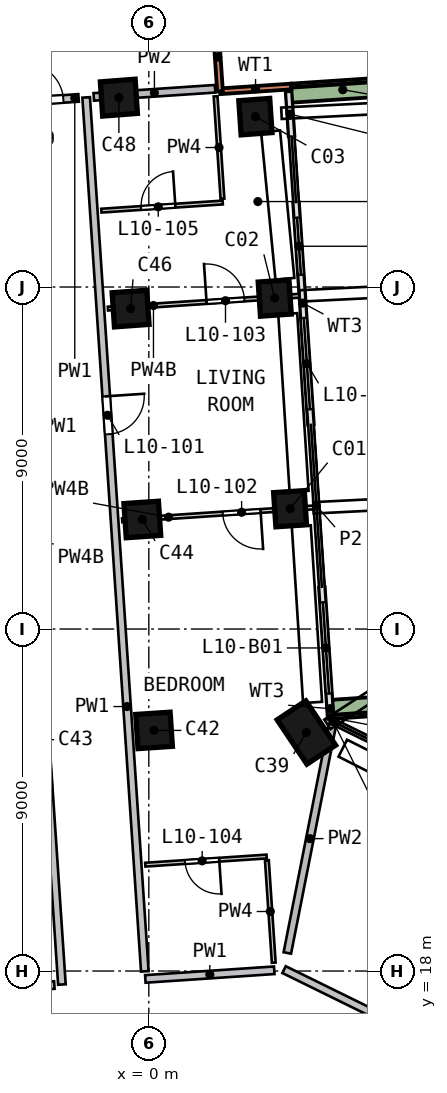
"""IFC4 building model, lengths in metres.
Left out: names, types, materials, properties, quantities, classifications, styles, units other than length and angle.
Written with IfcOpenShell. Run it as: python <this file> out.ifc"""

import sys

from ifc_helpers import new_model, si_unit, direction, frame, frame_2d, origin, origin_2d, place, context, subcontext, project, spatial, rectangle, extrude, element, fill, save


model = new_model("IFC4")
c1 = context("Model", 3, precision=1e-05, world=origin(), true_north=direction((0.0, 1.0)))
c2 = subcontext(c1, "Body", "Model", "MODEL_VIEW")
j1 = project(units=[si_unit("LENGTHUNIT", "METRE"), si_unit("PLANEANGLEUNIT", "RADIAN")], contexts=[c1])
p1 = place(None, origin())
s1 = spatial("IfcSite", under=j1, at=p1, CompositionType="ELEMENT")
p2 = place(p1, origin())
s2 = spatial("IfcBuilding", under=s1, at=p2, CompositionType="ELEMENT")
p3 = place(p2, frame((0.0, 0.0, 49.5)))
s3 = spatial("IfcBuildingStorey", under=s2, at=p3, CompositionType="ELEMENT", Elevation=49.5)
p4 = place(p3, frame((3.888, 30.17, 0.0), z_axis=(-0.141378211, -0.003182146, 0.989950542), x_axis=(-0.066245791, 0.997783739, -0.006253462)))
e1 = element("IfcColumn", 1, at=p4, inside=s3, PredefinedType="COLUMN", context=c2, shape_type="SweptSolid", body=[
    extrude(rectangle(XDim=0.9, YDim=0.8, at=origin_2d()), origin(), (0.0, 0.0, 1.0), 3.222),
])
p5 = place(p3, frame((3.514, 35.74, 0.0), z_axis=(-0.16539803, -0.025428438, 0.985899024), x_axis=(-0.069309244, 0.997495574, 0.014099965)))
e2 = element("IfcColumn", 2, at=p5, inside=s3, PredefinedType="COLUMN", context=c2, shape_type="SweptSolid", body=[
    extrude(rectangle(XDim=0.9, YDim=0.8, at=origin_2d()), origin(), (0.0, 0.0, 1.0), 3.236),
])
p6 = place(p3, frame((3.032, 40.542, 0.0), z_axis=(-0.185536283, -0.047999063, 0.981464405), x_axis=(-0.073598719, 0.996679535, 0.034830047)))
e3 = element("IfcColumn", 3, at=p6, inside=s3, PredefinedType="COLUMN", context=c2, shape_type="SweptSolid", body=[
    extrude(rectangle(XDim=0.9, YDim=0.8, at=origin_2d()), origin(), (0.0, 0.0, 1.0), 3.25),
])
p7 = place(p3, frame((4.285, 24.253, 0.0), z_axis=(-0.115456489, 0.019382097, 0.993123423), x_axis=(0.549525351, -0.831626922, 0.080115864)))
e4 = element("IfcColumn", 4, at=p7, inside=s3, PredefinedType="COLUMN", context=c2, shape_type="SweptSolid", body=[
    extrude(rectangle(XDim=1.4, YDim=0.9, at=origin_2d()), origin(), (0.0, 0.0, 1.0), 3.212),
])
p8 = place(p3, frame((0.278, 24.332, 0.0), z_axis=(-0.11570319, 0.000380102, 0.99328376), x_axis=(-0.065780406, 0.997801697, -0.008044297)))
e5 = element("IfcColumn", 5, at=p8, inside=s3, PredefinedType="COLUMN", context=c2, shape_type="SweptSolid", body=[
    extrude(rectangle(XDim=0.9, YDim=0.9, at=origin_2d()), origin(), (0.0, 0.0, 1.0), 3.211),
])
p9 = place(p3, frame((-0.001, 29.909, 0.0), z_axis=(-0.140009368, -0.021592354, 0.989914717), x_axis=(-0.06878046, 0.997559272, 0.012031081)))
e6 = element("IfcColumn", 6, at=p9, inside=s3, PredefinedType="COLUMN", context=c2, shape_type="SweptSolid", body=[
    extrude(rectangle(XDim=0.9, YDim=0.9, at=origin_2d()), origin(), (0.0, 0.0, 1.0), 3.222),
])
p10 = place(p3, frame((-0.28, 35.486, 0.0), z_axis=(-0.163975747, -0.043294424, 0.985513849), x_axis=(-0.07220614, 0.996883302, 0.0317798)))
e7 = element("IfcColumn", 7, at=p10, inside=s3, PredefinedType="COLUMN", context=c2, shape_type="SweptSolid", body=[
    extrude(rectangle(XDim=0.9, YDim=0.9, at=origin_2d()), origin(), (0.0, 0.0, 1.0), 3.237),
])
p11 = place(p3, frame((-0.558, 41.063, 0.0), z_axis=(-0.187533048, -0.064736408, 0.980122724), x_axis=(-0.076631345, 0.995748863, 0.051106146)))
e8 = element("IfcColumn", 8, at=p11, inside=s3, PredefinedType="COLUMN", context=c2, shape_type="SweptSolid", body=[
    extrude(rectangle(XDim=0.9, YDim=0.9, at=origin_2d()), origin(), (0.0, 0.0, 1.0), 3.255),
])
p12 = place(p3, frame((3.744, 41.276, 0.0), z_axis=(0.0, 0.0, 1.0), x_axis=(-0.997757997, -0.066925174, 0.0)))
e9 = element("IfcWall", 9, at=p12, inside=s3, PredefinedType="SOLIDWALL", context=c2, shape_type="SweptSolid", body=[
    extrude(rectangle(XDim=1.875, YDim=0.15, at=frame_2d((0.938, 0.0))), origin(), (0.0, 0.0, 1.0), 3.19),
])
p13 = place(p3, frame((1.873, 41.151, 0.0), z_axis=(0.0, 0.0, 1.0), x_axis=(-0.067005139, 0.99775263, 0.0)))
e10 = element("IfcWall", 10, at=p13, inside=s3, PredefinedType="SOLIDWALL", context=c2, shape_type="SweptSolid", body=[
    extrude(rectangle(XDim=1.8, YDim=0.15, at=frame_2d((0.9, 0.0))), origin(), (0.0, 0.0, 1.0), 3.19),
])
p14 = place(p3, frame((4.781, 24.704, 0.0), z_axis=(0.0, 0.0, 1.0), x_axis=(-0.066962013, 0.997755526, 0.0)))
e11 = element("IfcWall", 11, at=p14, inside=s3, PredefinedType="SOLIDWALL", context=c2, shape_type="SweptSolid", body=[
    extrude(rectangle(XDim=3.402, YDim=0.15, at=frame_2d((1.701, 0.0))), origin(), (0.0, 0.0, 1.0), 2.425),
])
p15 = place(p14, frame((0.602, 0.0, 0.0)))
e12 = element("IfcOpeningElement", 12, at=p15, cuts=e11, PredefinedType="OPENING", context=c2, shape_type="SweptSolid", body=[
    extrude(rectangle(XDim=2.4, YDim=2.4, at=frame_2d((1.2, 1.2))), frame((0.0, 0.085, 0.0), z_axis=(0.0, -1.0, 0.0), x_axis=(1.0, 0.0, 0.0)), (0.0, 0.0, 1.0), 0.17),
])
p16 = place(p3, frame((4.266, 32.387, 0.0), z_axis=(0.0, 0.0, 1.0), x_axis=(-0.066996111, 0.997753237, 0.0)))
e13 = element("IfcWall", 13, at=p16, inside=s3, PredefinedType="SOLIDWALL", context=c2, shape_type="SweptSolid", body=[
    extrude(rectangle(XDim=3.396, YDim=0.15, at=frame_2d((1.698, 0.0))), origin(), (0.0, 0.0, 1.0), 2.425),
])
p17 = place(p16, frame((0.4, 0.0, 0.0)))
e14 = element("IfcOpeningElement", 14, at=p17, cuts=e13, PredefinedType="OPENING", context=c2, shape_type="SweptSolid", body=[
    extrude(rectangle(XDim=2.4, YDim=2.4, at=frame_2d((1.2, 1.2))), frame((0.0, 0.085, 0.0), z_axis=(0.0, -1.0, 0.0), x_axis=(1.0, 0.0, 0.0)), (0.0, 0.0, 1.0), 0.17),
])
p18 = place(p3, frame((4.038, 35.776, 0.0), z_axis=(0.0, 0.0, 1.0), x_axis=(-0.066968778, 0.997755072, 0.0)))
e15 = element("IfcWall", 15, at=p18, inside=s3, PredefinedType="SOLIDWALL", context=c2, shape_type="SweptSolid", body=[
    extrude(rectangle(XDim=2.45, YDim=0.15, at=frame_2d((1.225, 0.0))), origin(), (0.0, 0.0, 1.0), 2.425),
])
p19 = place(p18, frame((0.55, 0.0, 0.0)))
e16 = element("IfcOpeningElement", 16, at=p19, cuts=e15, PredefinedType="OPENING", context=c2, shape_type="SweptSolid", body=[
    extrude(rectangle(XDim=1.5, YDim=2.4, at=frame_2d((0.75, 1.2))), frame((0.0, 0.085, 0.0), z_axis=(0.0, -1.0, 0.0), x_axis=(1.0, 0.0, 0.0)), (0.0, 0.0, 1.0), 0.17),
])
p20 = place(p3, frame((3.756, 39.974, 0.0), z_axis=(0.0, 0.0, 1.0), x_axis=(-0.066995929, 0.997753249, 0.0)))
e17 = element("IfcWall", 17, at=p20, inside=s3, PredefinedType="SOLIDWALL", context=c2, shape_type="SweptSolid", body=[
    extrude(rectangle(XDim=1.155, YDim=0.15, at=frame_2d((0.578, 0.0))), origin(), (0.0, 0.0, 1.0), 2.425),
])
p21 = place(p3, frame((4.845, 24.889, 0.0), z_axis=(0.0, 0.0, 1.0), x_axis=(0.997752622, 0.067005263, 0.0)))
e18 = element("IfcWall", 18, at=p21, inside=s3, PredefinedType="SOLIDWALL", context=c2, shape_type="SweptSolid", body=[
    extrude(rectangle(XDim=3.199, YDim=0.5, at=frame_2d((1.6, 0.0))), origin(), (0.0, 0.0, 1.0), 0.7),
])
p22 = place(p3, frame((6.45, 41.283, 0.0), z_axis=(0.0, 0.0, 1.0), x_axis=(-0.997751006, -0.067029329, 0.0)))
e19 = element("IfcWall", 19, at=p22, inside=s3, PredefinedType="SOLIDWALL", context=c2, shape_type="SweptSolid", body=[
    extrude(rectangle(XDim=2.699, YDim=0.5, at=frame_2d((1.35, 0.0))), origin(), (0.0, 0.0, 1.0), 0.7),
])
p23 = place(p3, frame((-2.486, 17.631, 0.0), z_axis=(0.0, 0.0, 1.0), x_axis=(-0.997758214, -0.066921946, 0.0)))
e20 = element("IfcWall", 20, at=p23, inside=s3, PredefinedType="SOLIDWALL", context=c2, shape_type="SweptSolid", body=[
    extrude(rectangle(XDim=3.458, YDim=0.2, at=frame_2d((1.729, 0.0))), origin(), (0.0, 0.0, 1.0), 3.19),
])
p24 = place(p3, frame((-2.287, 17.645, 0.0), z_axis=(0.0, 0.0, 1.0), x_axis=(-0.066974116, 0.997754713, 0.0)))
e21 = element("IfcWall", 21, at=p24, inside=s3, PredefinedType="SOLIDWALL", context=c2, shape_type="SweptSolid", body=[
    extrude(rectangle(XDim=23.25, YDim=0.2, at=frame_2d((11.625, 0.0))), origin(), (0.0, 0.0, 1.0), 3.19),
])
p25 = place(p24, frame((4.95, 0.0, 0.0)))
e22 = element("IfcOpeningElement", 22, at=p25, cuts=e21, PredefinedType="OPENING", context=c2, shape_type="SweptSolid", body=[
    extrude(rectangle(XDim=1.0, YDim=2.1, at=frame_2d((0.5, 1.05))), frame((0.0, 0.11, 0.0), z_axis=(0.0, -1.0, 0.0), x_axis=(1.0, 0.0, 0.0)), (0.0, 0.0, 1.0), 0.22),
])
p26 = place(p3, frame((-3.646, 40.855, 0.0), z_axis=(0.0, 0.0, 1.0), x_axis=(0.997748437, 0.067067555, 0.0)))
e23 = element("IfcWall", 23, at=p26, inside=s3, PredefinedType="SOLIDWALL", context=c2, shape_type="SweptSolid", body=[
    extrude(rectangle(XDim=1.802, YDim=0.2, at=frame_2d((0.901, 0.0))), origin(), (0.0, 0.0, 1.0), 3.19),
])
p27 = place(p26, frame((0.4, 0.0, 0.0)))
e24 = element("IfcOpeningElement", 24, at=p27, cuts=e23, PredefinedType="OPENING", context=c2, shape_type="SweptSolid", body=[
    extrude(rectangle(XDim=1.0, YDim=2.1, at=frame_2d((0.5, 1.05))), frame((0.0, 0.11, 0.0), z_axis=(0.0, -1.0, 0.0), x_axis=(1.0, 0.0, 0.0)), (0.0, 0.0, 1.0), 0.22),
])
p28 = place(p3, frame((-1.649, 40.99, 0.0), z_axis=(0.0, 0.0, 1.0), x_axis=(0.066973147, -0.997754778, 0.0)))
e25 = element("IfcWall", 25, at=p28, inside=s3, PredefinedType="SOLIDWALL", context=c2, shape_type="SweptSolid", body=[
    extrude(rectangle(XDim=23.05, YDim=0.2, at=frame_2d((11.525, 0.0))), origin(), (0.0, 0.0, 1.0), 3.19),
])
p29 = place(p28, frame((7.883, 0.0, 0.0)))
e26 = element("IfcOpeningElement", 26, at=p29, cuts=e25, PredefinedType="OPENING", context=c2, shape_type="SweptSolid", body=[
    extrude(rectangle(XDim=1.0, YDim=2.1, at=frame_2d((0.5, 1.05))), frame((0.0, 0.11, 0.0), z_axis=(0.0, -1.0, 0.0), x_axis=(1.0, 0.0, 0.0)), (0.0, 0.0, 1.0), 0.22),
])
p30 = place(p3, frame((3.301, 18.02, 0.0), z_axis=(0.0, 0.0, 1.0), x_axis=(-0.997753271, -0.066995596, 0.0)))
e27 = element("IfcWall", 27, at=p30, inside=s3, PredefinedType="SOLIDWALL", context=c2, shape_type="SweptSolid", body=[
    extrude(rectangle(XDim=3.4, YDim=0.2, at=frame_2d((1.7, 0.0))), origin(), (0.0, 0.0, 1.0), 3.19),
])
p31 = place(p3, frame((12.1, 13.842, 0.0), z_axis=(0.0, 0.0, 1.0), x_axis=(-0.897570713, 0.44087052, 0.0)))
e28 = element("IfcWall", 28, at=p31, inside=s3, PredefinedType="SOLIDWALL", context=c2, shape_type="SweptSolid", body=[
    extrude(rectangle(XDim=9.516, YDim=0.2, at=frame_2d((4.758, 0.0))), origin(), (0.0, 0.0, 1.0), 3.19),
])
p32 = place(p3, frame((-1.449, 41.003, 0.0), z_axis=(0.0, 0.0, 1.0), x_axis=(0.997753992, 0.06698486, 0.0)))
e29 = element("IfcWall", 29, at=p32, inside=s3, PredefinedType="SOLIDWALL", context=c2, shape_type="SweptSolid", body=[
    extrude(rectangle(XDim=3.2, YDim=0.2, at=frame_2d((1.6, 0.0))), origin(), (0.0, 0.0, 1.0), 3.19),
])
p33 = place(p3, frame((4.832, 24.492, 0.0), z_axis=(0.0, 0.0, 1.0), x_axis=(-0.193535211, -0.98109333, 0.0)))
e30 = element("IfcWall", 30, at=p33, inside=s3, PredefinedType="SOLIDWALL", context=c2, shape_type="SweptSolid", body=[
    extrude(rectangle(XDim=6.132, YDim=0.2, at=frame_2d((3.066, 0.0))), origin(), (0.0, 0.0, 1.0), 3.19),
])
p34 = place(p3, frame((-1.248, 38.01, 0.0), z_axis=(0.0, 0.0, 1.0), x_axis=(0.997753992, 0.06698486, 0.0)))
e31 = element("IfcWall", 31, at=p34, inside=s3, PredefinedType="PARTITIONING", context=c2, shape_type="SweptSolid", body=[
    extrude(rectangle(XDim=3.2, YDim=0.1, at=frame_2d((1.6, 0.0))), origin(), (0.0, 0.0, 1.0), 3.19),
])
p35 = place(p34, frame((1.05, 0.0, 0.0)))
e32 = element("IfcOpeningElement", 32, at=p35, cuts=e31, PredefinedType="OPENING", context=c2, shape_type="SweptSolid", body=[
    extrude(rectangle(XDim=0.9, YDim=2.1, at=frame_2d((0.45, 1.05))), frame((0.0, 0.06, 0.0), z_axis=(0.0, -1.0, 0.0), x_axis=(1.0, 0.0, 0.0)), (0.0, 0.0, 1.0), 0.12),
])
p36 = place(p3, frame((-1.075, 35.432, 0.0), z_axis=(0.0, 0.0, 1.0), x_axis=(0.997755754, 0.066958606, 0.0)))
e33 = element("IfcWall", 33, at=p36, inside=s3, PredefinedType="PARTITIONING", context=c2, shape_type="SweptSolid", body=[
    extrude(rectangle(XDim=5.05, YDim=0.1, at=frame_2d((2.525, 0.0))), origin(), (0.0, 0.0, 1.0), 2.69),
])
p37 = place(p36, frame((2.6, 0.0, 0.0)))
e34 = element("IfcOpeningElement", 34, at=p37, cuts=e33, PredefinedType="OPENING", context=c2, shape_type="SweptSolid", body=[
    extrude(rectangle(XDim=1.0, YDim=2.1, at=frame_2d((0.5, 1.05))), frame((0.0, 0.06, 0.0), z_axis=(0.0, -1.0, 0.0), x_axis=(1.0, 0.0, 0.0)), (0.0, 0.0, 1.0), 0.12),
])
p38 = place(p3, frame((3.1, 21.013, 0.0), z_axis=(0.0, 0.0, 1.0), x_axis=(-0.99775365, -0.06698996, 0.0)))
e35 = element("IfcWall", 35, at=p38, inside=s3, PredefinedType="PARTITIONING", context=c2, shape_type="SweptSolid", body=[
    extrude(rectangle(XDim=3.2, YDim=0.1, at=frame_2d((1.6, 0.0))), origin(), (0.0, 0.0, 1.0), 3.19),
])
p39 = place(p38, frame((1.25, 0.0, 0.0)))
e36 = element("IfcOpeningElement", 36, at=p39, cuts=e35, PredefinedType="OPENING", context=c2, shape_type="SweptSolid", body=[
    extrude(rectangle(XDim=0.9, YDim=2.1, at=frame_2d((0.45, 1.05))), frame((0.0, 0.06, 0.0), z_axis=(0.0, -1.0, 0.0), x_axis=(1.0, 0.0, 0.0)), (0.0, 0.0, 1.0), 0.12),
])
p40 = place(p3, frame((4.337, 30.2, 0.0), z_axis=(0.0, 0.0, 1.0), x_axis=(-0.997755754, -0.066958606, 0.0)))
e37 = element("IfcWall", 37, at=p40, inside=s3, PredefinedType="PARTITIONING", context=c2, shape_type="SweptSolid", body=[
    extrude(rectangle(XDim=5.05, YDim=0.1, at=frame_2d((2.525, 0.0))), origin(), (0.0, 0.0, 1.0), 2.69),
])
p41 = place(p40, frame((1.4, 0.0, 0.0)))
e38 = element("IfcOpeningElement", 38, at=p41, cuts=e37, PredefinedType="OPENING", context=c2, shape_type="SweptSolid", body=[
    extrude(rectangle(XDim=1.0, YDim=2.1, at=frame_2d((0.5, 1.05))), frame((0.0, 0.06, 0.0), z_axis=(0.0, -1.0, 0.0), x_axis=(1.0, 0.0, 0.0)), (0.0, 0.0, 1.0), 0.12),
])
p42 = place(p3, frame((1.938, 38.324, 0.0), z_axis=(0.0, 0.0, 1.0), x_axis=(-0.066909082, 0.997759077, 0.0)))
e39 = element("IfcWall", 39, at=p42, inside=s3, PredefinedType="PARTITIONING", context=c2, shape_type="SweptSolid", body=[
    extrude(rectangle(XDim=2.7, YDim=0.1, at=frame_2d((1.35, 0.0))), origin(), (0.0, 0.0, 1.0), 3.19),
])
p43 = place(p3, frame((3.287, 18.219, 0.0), z_axis=(0.0, 0.0, 1.0), x_axis=(-0.066915118, 0.997758672, 0.0)))
e40 = element("IfcWall", 40, at=p43, inside=s3, PredefinedType="PARTITIONING", context=c2, shape_type="SweptSolid", body=[
    extrude(rectangle(XDim=2.7, YDim=0.1, at=frame_2d((1.35, 0.0))), origin(), (0.0, 0.0, 1.0), 3.19),
])
p44 = place(p15, origin())
e41 = element("IfcDoor", 41, at=p44, inside=s3, OperationType="SLIDING_TO_LEFT", PredefinedType="DOOR", context=c2, shape_type="SweptSolid", body=[
    extrude(rectangle(XDim=2.4, YDim=2.4, at=frame_2d((1.2, 1.2))), frame((0.0, 0.025, 0.0), z_axis=(0.0, -1.0, 0.0), x_axis=(1.0, 0.0, 0.0)), (0.0, 0.0, 1.0), 0.05),
])
fill(e12, e41)
p45 = place(p17, origin())
e42 = element("IfcDoor", 42, at=p45, inside=s3, OperationType="SLIDING_TO_RIGHT", PredefinedType="DOOR", context=c2, shape_type="SweptSolid", body=[
    extrude(rectangle(XDim=2.4, YDim=2.4, at=frame_2d((1.2, 1.2))), frame((0.0, 0.025, 0.0), z_axis=(0.0, -1.0, 0.0), x_axis=(1.0, 0.0, 0.0)), (0.0, 0.0, 1.0), 0.05),
])
fill(e14, e42)
p46 = place(p19, origin())
e43 = element("IfcDoor", 43, at=p46, inside=s3, OperationType="SLIDING_TO_LEFT", PredefinedType="DOOR", context=c2, shape_type="SweptSolid", body=[
    extrude(rectangle(XDim=1.5, YDim=2.4, at=frame_2d((0.75, 1.2))), frame((0.0, 0.025, 0.0), z_axis=(0.0, -1.0, 0.0), x_axis=(1.0, 0.0, 0.0)), (0.0, 0.0, 1.0), 0.05),
])
fill(e16, e43)
p47 = place(p29, origin())
e44 = element("IfcDoor", 44, at=p47, inside=s3, OperationType="SINGLE_SWING_LEFT", PredefinedType="DOOR", context=c2, shape_type="SweptSolid", body=[
    extrude(rectangle(XDim=1.0, YDim=2.1, at=frame_2d((0.5, 1.05))), frame((0.0, 0.025, 0.0), z_axis=(0.0, -1.0, 0.0), x_axis=(1.0, 0.0, 0.0)), (0.0, 0.0, 1.0), 0.05),
])
fill(e26, e44)
p48 = place(p41, origin())
e45 = element("IfcDoor", 45, at=p48, inside=s3, OperationType="SINGLE_SWING_LEFT", PredefinedType="DOOR", context=c2, shape_type="SweptSolid", body=[
    extrude(rectangle(XDim=1.0, YDim=2.1, at=frame_2d((0.5, 1.05))), frame((0.0, 0.025, 0.0), z_axis=(0.0, -1.0, 0.0), x_axis=(1.0, 0.0, 0.0)), (0.0, 0.0, 1.0), 0.05),
])
fill(e38, e45)
p49 = place(p37, origin())
e46 = element("IfcDoor", 46, at=p49, inside=s3, OperationType="SINGLE_SWING_LEFT", PredefinedType="DOOR", context=c2, shape_type="SweptSolid", body=[
    extrude(rectangle(XDim=1.0, YDim=2.1, at=frame_2d((0.5, 1.05))), frame((0.0, 0.025, 0.0), z_axis=(0.0, -1.0, 0.0), x_axis=(1.0, 0.0, 0.0)), (0.0, 0.0, 1.0), 0.05),
])
fill(e34, e46)
p50 = place(p39, origin())
e47 = element("IfcDoor", 47, at=p50, inside=s3, OperationType="SINGLE_SWING_LEFT", PredefinedType="DOOR", context=c2, shape_type="SweptSolid", body=[
    extrude(rectangle(XDim=0.9, YDim=2.1, at=frame_2d((0.45, 1.05))), frame((0.0, 0.025, 0.0), z_axis=(0.0, -1.0, 0.0), x_axis=(1.0, 0.0, 0.0)), (0.0, 0.0, 1.0), 0.05),
])
fill(e36, e47)
p51 = place(p35, origin())
e48 = element("IfcDoor", 48, at=p51, inside=s3, OperationType="SINGLE_SWING_RIGHT", PredefinedType="DOOR", context=c2, shape_type="SweptSolid", body=[
    extrude(rectangle(XDim=0.9, YDim=2.1, at=frame_2d((0.45, 1.05))), frame((0.0, 0.025, 0.0), z_axis=(0.0, -1.0, 0.0), x_axis=(1.0, 0.0, 0.0)), (0.0, 0.0, 1.0), 0.05),
])
fill(e32, e48)
p52 = place(p27, origin())
e49 = element("IfcDoor", 49, at=p52, inside=s3, OperationType="SINGLE_SWING_LEFT", PredefinedType="DOOR", context=c2, shape_type="SweptSolid", body=[
    extrude(rectangle(XDim=1.0, YDim=2.1, at=frame_2d((0.5, 1.05))), frame((0.0, 0.025, 0.0), z_axis=(0.0, -1.0, 0.0), x_axis=(1.0, 0.0, 0.0)), (0.0, 0.0, 1.0), 0.05),
])
fill(e24, e49)
save(model, sys.argv[1])
